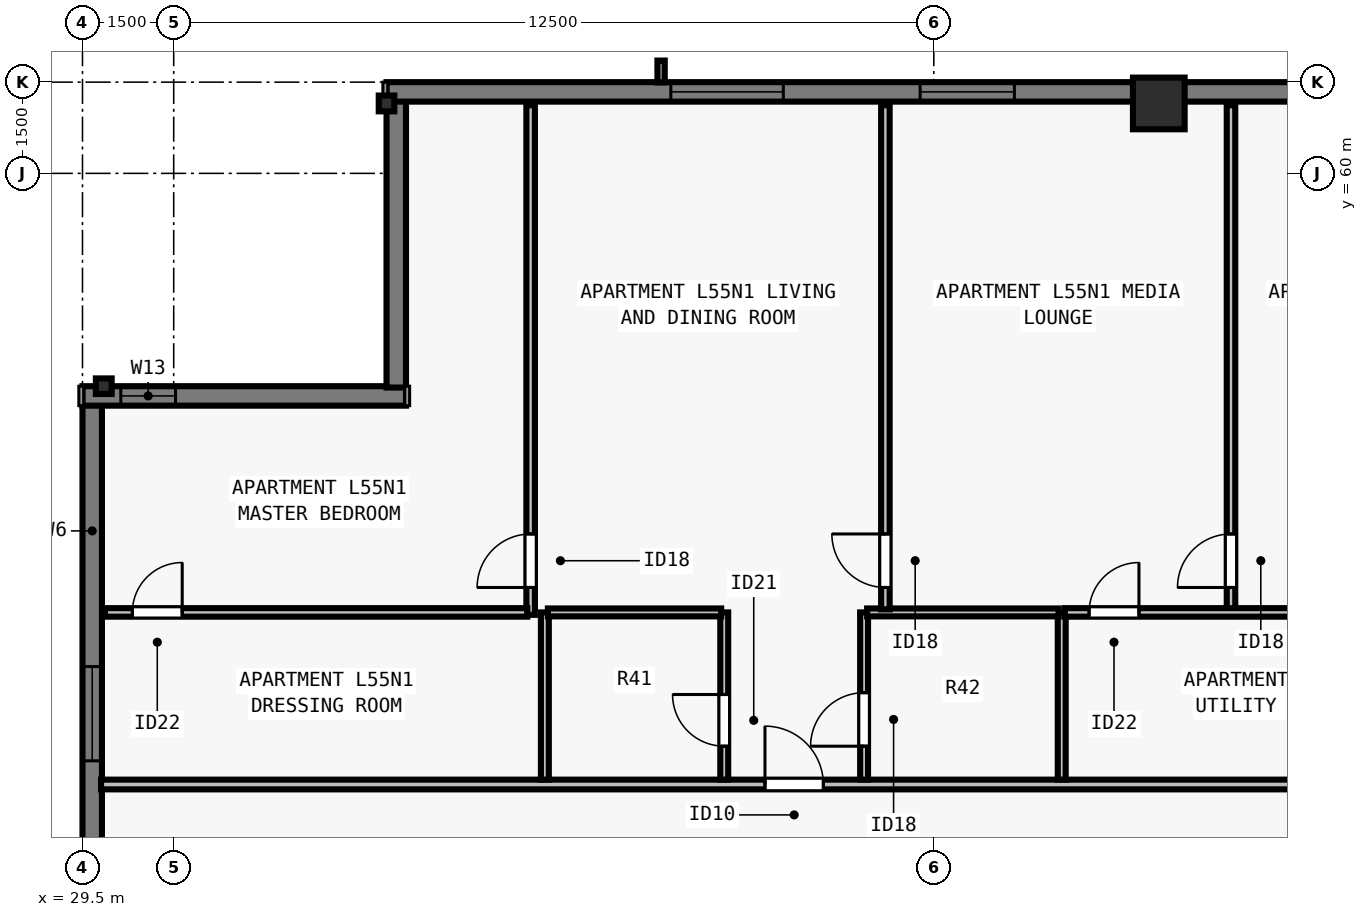
"""IFC4 building model, lengths in metres.
Left out: names, types, materials, properties, quantities, classifications, styles, units other than length and angle.
Written with IfcOpenShell. Run it as: python <this file> out.ifc"""

import sys

from ifc_helpers import new_model, si_unit, direction, frame, frame_2d, origin, origin_2d, place, context, subcontext, project, spatial, rectangle, i_section, extrude, element, fill, save


model = new_model("IFC4")
c1 = context("Model", 3, precision=1e-05, world=origin(), true_north=direction((0.0, 1.0)))
c2 = subcontext(c1, "Body", "Model", "MODEL_VIEW")
j1 = project(units=[si_unit("LENGTHUNIT", "METRE"), si_unit("PLANEANGLEUNIT", "RADIAN")], contexts=[c1])
p1 = place(None, origin())
s1 = spatial("IfcSite", under=j1, at=p1, CompositionType="ELEMENT")
p2 = place(p1, origin())
s2 = spatial("IfcBuilding", under=s1, at=p2, CompositionType="ELEMENT")
p3 = place(p2, frame((0.0, 0.0, 202.5)))
s3 = spatial("IfcBuildingStorey", under=s2, at=p3, CompositionType="ELEMENT", Elevation=202.5)
p4 = place(p3, frame((47.2, 61.15, 0.0), z_axis=(0.0, 0.0, 1.0), x_axis=(1.0, 0.0, 0.0)))
e1 = element("IfcColumn", 1, at=p4, inside=s3, PredefinedType="COLUMN", context=c2, shape_type="SweptSolid", body=[
    extrude(rectangle(XDim=0.85, YDim=0.85, at=origin_2d()), origin(), (0.0, 0.0, 1.0), 3.5),
])
for number, where, z_axis, x_axis in (
    (2, (34.5, 61.15, 0.0), (0.0, 0.0, 1.0), (1.0, 0.0, 0.0)),
    (3, (29.85, 56.5, 0.0), (0.0, 0.0, 1.0), (0.0, 1.0, 0.0)),
):
    element("IfcColumn", number, at=place(p3, frame(where, z_axis=z_axis, x_axis=x_axis)), inside=s3, PredefinedType="COLUMN", context=c2, shape_type="SweptSolid", body=[
        extrude(i_section(OverallWidth=0.256, OverallDepth=0.26, WebThickness=0.01, FlangeThickness=0.017, FilletRadius=0.013, at=origin_2d()), origin(), (0.0, 0.0, 1.0), 3.5),
    ])
p5 = place(p3, frame((29.66, 21.5, 0.0), z_axis=(0.0, 0.0, 1.0), x_axis=(0.0, 1.0, 0.0)))
e4 = element("IfcWall", 4, at=p5, inside=s3, PredefinedType="SOLIDWALL", context=c2, shape_type="SweptSolid", body=[
    extrude(rectangle(XDim=34.702, YDim=0.32, at=frame_2d((17.351, 0.0))), origin(), (0.0, 0.0, 1.0), 3.29),
])
p6 = place(p5, frame((4.163, 0.0, 0.8)))
e5 = element("IfcOpeningElement", 5, at=p6, cuts=e4, PredefinedType="OPENING", context=c2, shape_type="SweptSolid", body=[
    extrude(rectangle(XDim=1.85, YDim=1.678, at=frame_2d((0.925, 0.839))), frame((0.0, 0.17, 0.0), z_axis=(0.0, -1.0, 0.0), x_axis=(1.0, 0.0, 0.0)), (0.0, 0.0, 1.0), 0.34),
])
p7 = place(p5, frame((6.888, 0.0, 0.8)))
e6 = element("IfcOpeningElement", 6, at=p7, cuts=e4, PredefinedType="OPENING", context=c2, shape_type="SweptSolid", body=[
    extrude(rectangle(XDim=1.55, YDim=1.678, at=frame_2d((0.775, 0.839))), frame((0.0, 0.17, 0.0), z_axis=(0.0, -1.0, 0.0), x_axis=(1.0, 0.0, 0.0)), (0.0, 0.0, 1.0), 0.34),
])
p8 = place(p5, frame((10.113, 0.0, 0.8)))
e7 = element("IfcOpeningElement", 7, at=p8, cuts=e4, PredefinedType="OPENING", context=c2, shape_type="SweptSolid", body=[
    extrude(rectangle(XDim=1.85, YDim=1.678, at=frame_2d((0.925, 0.839))), frame((0.0, 0.17, 0.0), z_axis=(0.0, -1.0, 0.0), x_axis=(1.0, 0.0, 0.0)), (0.0, 0.0, 1.0), 0.34),
])
p9 = place(p5, frame((14.888, 0.0, 0.8)))
e8 = element("IfcOpeningElement", 8, at=p9, cuts=e4, PredefinedType="OPENING", context=c2, shape_type="SweptSolid", body=[
    extrude(rectangle(XDim=1.55, YDim=1.678, at=frame_2d((0.775, 0.839))), frame((0.0, 0.17, 0.0), z_axis=(0.0, -1.0, 0.0), x_axis=(1.0, 0.0, 0.0)), (0.0, 0.0, 1.0), 0.34),
])
p10 = place(p5, frame((19.364, 0.0, 0.8)))
e9 = element("IfcOpeningElement", 9, at=p10, cuts=e4, PredefinedType="OPENING", context=c2, shape_type="SweptSolid", body=[
    extrude(rectangle(XDim=1.85, YDim=1.678, at=frame_2d((0.925, 0.839))), frame((0.0, 0.17, 0.0), z_axis=(0.0, -1.0, 0.0), x_axis=(1.0, 0.0, 0.0)), (0.0, 0.0, 1.0), 0.34),
])
p11 = place(p5, frame((23.614, 0.0, 0.8)))
e10 = element("IfcOpeningElement", 10, at=p11, cuts=e4, PredefinedType="OPENING", context=c2, shape_type="SweptSolid", body=[
    extrude(rectangle(XDim=1.85, YDim=1.678, at=frame_2d((0.925, 0.839))), frame((0.0, 0.17, 0.0), z_axis=(0.0, -1.0, 0.0), x_axis=(1.0, 0.0, 0.0)), (0.0, 0.0, 1.0), 0.34),
])
p12 = place(p5, frame((28.839, 0.0, 0.8)))
e11 = element("IfcOpeningElement", 11, at=p12, cuts=e4, PredefinedType="OPENING", context=c2, shape_type="SweptSolid", body=[
    extrude(rectangle(XDim=1.55, YDim=1.678, at=frame_2d((0.775, 0.839))), frame((0.0, 0.17, 0.0), z_axis=(0.0, -1.0, 0.0), x_axis=(1.0, 0.0, 0.0)), (0.0, 0.0, 1.0), 0.34),
])
p13 = place(p3, frame((29.5, 56.34, 0.0), z_axis=(0.0, 0.0, 1.0), x_axis=(1.0, 0.0, 0.0)))
e12 = element("IfcWall", 12, at=p13, inside=s3, PredefinedType="SOLIDWALL", context=c2, shape_type="SweptSolid", body=[
    extrude(rectangle(XDim=5.32, YDim=0.32, at=frame_2d((2.66, 0.0))), origin(), (0.0, 0.0, 1.0), 3.29),
])
p14 = place(p13, frame((0.63, 0.0, 0.8)))
e13 = element("IfcOpeningElement", 13, at=p14, cuts=e12, PredefinedType="OPENING", context=c2, shape_type="SweptSolid", body=[
    extrude(rectangle(XDim=0.9, YDim=1.678, at=frame_2d((0.45, 0.839))), frame((0.0, 0.17, 0.0), z_axis=(0.0, -1.0, 0.0), x_axis=(1.0, 0.0, 0.0)), (0.0, 0.0, 1.0), 0.34),
])
p15 = place(p3, frame((34.66, 56.478, 0.0), z_axis=(0.0, 0.0, 1.0), x_axis=(0.0, 1.0, 0.0)))
e14 = element("IfcWall", 14, at=p15, inside=s3, PredefinedType="SOLIDWALL", context=c2, shape_type="SweptSolid", body=[
    extrude(rectangle(XDim=4.724, YDim=0.32, at=frame_2d((2.362, 0.0))), origin(), (0.0, 0.0, 1.0), 3.29),
])
p16 = place(p3, frame((34.5, 61.34, 0.0), z_axis=(0.0, 0.0, 1.0), x_axis=(1.0, 0.0, 0.0)))
e15 = element("IfcWall", 15, at=p16, inside=s3, PredefinedType="SOLIDWALL", context=c2, shape_type="SweptSolid", body=[
    extrude(rectangle(XDim=22.602, YDim=0.32, at=frame_2d((11.301, 0.0))), origin(), (0.0, 0.0, 1.0), 3.29),
])
p17 = place(p16, frame((4.675, 0.0, 0.8)))
e16 = element("IfcOpeningElement", 16, at=p17, cuts=e15, PredefinedType="OPENING", context=c2, shape_type="SweptSolid", body=[
    extrude(rectangle(XDim=1.85, YDim=1.678, at=frame_2d((0.925, 0.839))), frame((0.0, 0.17, 0.0), z_axis=(0.0, -1.0, 0.0), x_axis=(1.0, 0.0, 0.0)), (0.0, 0.0, 1.0), 0.34),
])
p18 = place(p16, frame((8.776, 0.0, 0.8)))
e17 = element("IfcOpeningElement", 17, at=p18, cuts=e15, PredefinedType="OPENING", context=c2, shape_type="SweptSolid", body=[
    extrude(rectangle(XDim=1.55, YDim=1.678, at=frame_2d((0.775, 0.839))), frame((0.0, 0.17, 0.0), z_axis=(0.0, -1.0, 0.0), x_axis=(1.0, 0.0, 0.0)), (0.0, 0.0, 1.0), 0.34),
])
p19 = place(p16, frame((15.326, 0.0, 0.8)))
e18 = element("IfcOpeningElement", 18, at=p19, cuts=e15, PredefinedType="OPENING", context=c2, shape_type="SweptSolid", body=[
    extrude(rectangle(XDim=1.55, YDim=1.678, at=frame_2d((0.775, 0.839))), frame((0.0, 0.17, 0.0), z_axis=(0.0, -1.0, 0.0), x_axis=(1.0, 0.0, 0.0)), (0.0, 0.0, 1.0), 0.34),
])
p20 = place(p16, frame((18.677, 0.0, 0.8)))
e19 = element("IfcOpeningElement", 19, at=p20, cuts=e15, PredefinedType="OPENING", context=c2, shape_type="SweptSolid", body=[
    extrude(rectangle(XDim=1.85, YDim=1.678, at=frame_2d((0.925, 0.839))), frame((0.0, 0.17, 0.0), z_axis=(0.0, -1.0, 0.0), x_axis=(1.0, 0.0, 0.0)), (0.0, 0.0, 1.0), 0.34),
])
p21 = place(p3, frame((29.805, 49.95, 0.0), z_axis=(0.0, 0.0, 1.0), x_axis=(1.0, 0.0, 0.0)))
e20 = element("IfcWall", 20, at=p21, inside=s3, PredefinedType="PARTITIONING", context=c2, shape_type="SweptSolid", body=[
    extrude(rectangle(XDim=44.39, YDim=0.16, at=frame_2d((22.195, 0.0))), origin(), (0.0, 0.0, 1.0), 2.958),
])
p22 = place(p21, frame((10.919, 0.0, 0.0)))
e21 = element("IfcOpeningElement", 21, at=p22, cuts=e20, PredefinedType="OPENING", context=c2, shape_type="SweptSolid", body=[
    extrude(rectangle(XDim=0.96, YDim=2.18, at=frame_2d((0.48, 1.09))), frame((0.0, 0.09, 0.0), z_axis=(0.0, -1.0, 0.0), x_axis=(1.0, 0.0, 0.0)), (0.0, 0.0, 1.0), 0.18),
])
p23 = place(p21, frame((32.999, 0.0, 0.0)))
e22 = element("IfcOpeningElement", 22, at=p23, cuts=e20, PredefinedType="OPENING", context=c2, shape_type="SweptSolid", body=[
    extrude(rectangle(XDim=0.96, YDim=2.18, at=frame_2d((0.48, 1.09))), frame((0.0, 0.09, 0.0), z_axis=(0.0, -1.0, 0.0), x_axis=(1.0, 0.0, 0.0)), (0.0, 0.0, 1.0), 0.18),
])
p24 = place(p3, frame((37.104, 50.03, 0.0), z_axis=(0.0, 0.0, 1.0), x_axis=(0.0, 1.0, 0.0)))
e23 = element("IfcWall", 23, at=p24, inside=s3, PredefinedType="PLUMBINGWALL", context=c2, shape_type="SweptSolid", body=[
    extrude(rectangle(XDim=2.75, YDim=0.13, at=frame_2d((1.375, 0.0))), origin(), (0.0, 0.0, 1.0), 3.29),
])
p25 = place(p3, frame((40.054, 50.03, 0.0), z_axis=(0.0, 0.0, 1.0), x_axis=(0.0, 1.0, 0.0)))
e24 = element("IfcWall", 24, at=p25, inside=s3, PredefinedType="PLUMBINGWALL", context=c2, shape_type="SweptSolid", body=[
    extrude(rectangle(XDim=2.75, YDim=0.13, at=frame_2d((1.375, 0.0))), origin(), (0.0, 0.0, 1.0), 2.573),
])
p26 = place(p25, frame((0.55, 0.0, 0.0)))
e25 = element("IfcOpeningElement", 25, at=p26, cuts=e24, PredefinedType="OPENING", context=c2, shape_type="SweptSolid", body=[
    extrude(rectangle(XDim=0.85, YDim=2.08, at=frame_2d((0.425, 1.04))), frame((0.0, 0.075, 0.0), z_axis=(0.0, -1.0, 0.0), x_axis=(1.0, 0.0, 0.0)), (0.0, 0.0, 1.0), 0.15),
])
p27 = place(p3, frame((37.154, 52.78, 0.0), z_axis=(0.0, 0.0, 1.0), x_axis=(1.0, 0.0, 0.0)))
e26 = element("IfcWall", 26, at=p27, inside=s3, PredefinedType="PLUMBINGWALL", context=c2, shape_type="SweptSolid", body=[
    extrude(rectangle(XDim=2.85, YDim=0.13, at=frame_2d((1.425, 0.0))), origin(), (0.0, 0.0, 1.0), 3.29),
])
p28 = place(p3, frame((45.604, 50.03, 0.0), z_axis=(0.0, 0.0, 1.0), x_axis=(0.0, 1.0, 0.0)))
e27 = element("IfcWall", 27, at=p28, inside=s3, PredefinedType="PLUMBINGWALL", context=c2, shape_type="SweptSolid", body=[
    extrude(rectangle(XDim=2.75, YDim=0.13, at=frame_2d((1.375, 0.0))), origin(), (0.0, 0.0, 1.0), 3.29),
])
p29 = place(p3, frame((42.354, 50.03, 0.0), z_axis=(0.0, 0.0, 1.0), x_axis=(0.0, 1.0, 0.0)))
e28 = element("IfcWall", 28, at=p29, inside=s3, PredefinedType="PLUMBINGWALL", context=c2, shape_type="SweptSolid", body=[
    extrude(rectangle(XDim=2.75, YDim=0.13, at=frame_2d((1.375, 0.0))), origin(), (0.0, 0.0, 1.0), 3.29),
])
p30 = place(p29, frame((0.55, 0.0, 0.0)))
e29 = element("IfcOpeningElement", 29, at=p30, cuts=e28, PredefinedType="OPENING", context=c2, shape_type="SweptSolid", body=[
    extrude(rectangle(XDim=0.88, YDim=2.1, at=frame_2d((0.44, 1.05))), frame((0.0, 0.075, 0.0), z_axis=(0.0, -1.0, 0.0), x_axis=(1.0, 0.0, 0.0)), (0.0, 0.0, 1.0), 0.15),
])
p31 = place(p3, frame((42.404, 52.78, 0.0), z_axis=(0.0, 0.0, 1.0), x_axis=(1.0, 0.0, 0.0)))
e30 = element("IfcWall", 30, at=p31, inside=s3, PredefinedType="PLUMBINGWALL", context=c2, shape_type="SweptSolid", body=[
    extrude(rectangle(XDim=3.15, YDim=0.13, at=frame_2d((1.575, 0.0))), origin(), (0.0, 0.0, 1.0), 3.29),
])
p32 = place(p3, frame((36.87, 52.74, 0.0), z_axis=(0.0, 0.0, 1.0), x_axis=(0.0, 1.0, 0.0)))
e31 = element("IfcWall", 31, at=p32, inside=s3, PredefinedType="PARTITIONING", context=c2, shape_type="SweptSolid", body=[
    extrude(rectangle(XDim=8.38, YDim=0.14, at=frame_2d((4.19, 0.0))), origin(), (0.0, 0.0, 1.0), 2.573),
])
p33 = place(p32, frame((0.45, 0.0, 0.0)))
e32 = element("IfcOpeningElement", 32, at=p33, cuts=e31, PredefinedType="OPENING", context=c2, shape_type="SweptSolid", body=[
    extrude(rectangle(XDim=0.88, YDim=2.1, at=frame_2d((0.44, 1.05))), frame((0.0, 0.08, 0.0), z_axis=(0.0, -1.0, 0.0), x_axis=(1.0, 0.0, 0.0)), (0.0, 0.0, 1.0), 0.16),
])
p34 = place(p3, frame((29.87, 52.78, 0.0), z_axis=(0.0, 0.0, 1.0), x_axis=(1.0, 0.0, 0.0)))
e33 = element("IfcWall", 33, at=p34, inside=s3, PredefinedType="PARTITIONING", context=c2, shape_type="SweptSolid", body=[
    extrude(rectangle(XDim=6.945, YDim=0.14, at=frame_2d((3.472, 0.0))), origin(), (0.0, 0.0, 1.0), 2.958),
])
p35 = place(p34, frame((0.45, 0.0, 0.0)))
e34 = element("IfcOpeningElement", 34, at=p35, cuts=e33, PredefinedType="OPENING", context=c2, shape_type="SweptSolid", body=[
    extrude(rectangle(XDim=0.82, YDim=2.1, at=frame_2d((0.41, 1.05))), frame((0.0, 0.08, 0.0), z_axis=(0.0, -1.0, 0.0), x_axis=(1.0, 0.0, 0.0)), (0.0, 0.0, 1.0), 0.16),
])
p36 = place(p3, frame((48.387, 52.74, 0.0), z_axis=(0.0, 0.0, 1.0), x_axis=(0.0, 1.0, 0.0)))
e35 = element("IfcWall", 35, at=p36, inside=s3, PredefinedType="PARTITIONING", context=c2, shape_type="SweptSolid", body=[
    extrude(rectangle(XDim=8.38, YDim=0.14, at=frame_2d((4.19, 0.0))), origin(), (0.0, 0.0, 1.0), 3.29),
])
p37 = place(p36, frame((0.45, 0.0, 0.0)))
e36 = element("IfcOpeningElement", 36, at=p37, cuts=e35, PredefinedType="OPENING", context=c2, shape_type="SweptSolid", body=[
    extrude(rectangle(XDim=0.88, YDim=2.1, at=frame_2d((0.44, 1.05))), frame((0.0, 0.08, 0.0), z_axis=(0.0, -1.0, 0.0), x_axis=(1.0, 0.0, 0.0)), (0.0, 0.0, 1.0), 0.16),
])
p38 = place(p3, frame((45.654, 52.78, 0.0), z_axis=(0.0, 0.0, 1.0), x_axis=(1.0, 0.0, 0.0)))
e37 = element("IfcWall", 37, at=p38, inside=s3, PredefinedType="PARTITIONING", context=c2, shape_type="SweptSolid", body=[
    extrude(rectangle(XDim=6.884, YDim=0.14, at=frame_2d((3.442, 0.0))), origin(), (0.0, 0.0, 1.0), 3.29),
])
p39 = place(p38, frame((0.4, 0.0, 0.0)))
e38 = element("IfcOpeningElement", 38, at=p39, cuts=e37, PredefinedType="OPENING", context=c2, shape_type="SweptSolid", body=[
    extrude(rectangle(XDim=0.82, YDim=2.1, at=frame_2d((0.41, 1.05))), frame((0.0, 0.08, 0.0), z_axis=(0.0, -1.0, 0.0), x_axis=(1.0, 0.0, 0.0)), (0.0, 0.0, 1.0), 0.16),
])
p40 = place(p3, frame((42.704, 52.83, 0.0), z_axis=(0.0, 0.0, 1.0), x_axis=(0.0, 1.0, 0.0)))
e39 = element("IfcWall", 39, at=p40, inside=s3, PredefinedType="PARTITIONING", context=c2, shape_type="SweptSolid", body=[
    extrude(rectangle(XDim=8.29, YDim=0.14, at=frame_2d((4.145, 0.0))), origin(), (0.0, 0.0, 1.0), 3.29),
])
p41 = place(p40, frame((0.36, 0.0, 0.0)))
e40 = element("IfcOpeningElement", 40, at=p41, cuts=e39, PredefinedType="OPENING", context=c2, shape_type="SweptSolid", body=[
    extrude(rectangle(XDim=0.88, YDim=2.1, at=frame_2d((0.44, 1.05))), frame((0.0, 0.08, 0.0), z_axis=(0.0, -1.0, 0.0), x_axis=(1.0, 0.0, 0.0)), (0.0, 0.0, 1.0), 0.16),
])
p42 = place(p12, origin())
e41 = element("IfcWindow", 41, at=p42, inside=s3, PartitioningType="SINGLE_PANEL", PredefinedType="WINDOW", context=c2, shape_type="SweptSolid", body=[
    extrude(rectangle(XDim=1.55, YDim=1.678, at=frame_2d((0.775, 0.839))), frame((0.0, -0.05, 0.0), z_axis=(0.0, -1.0, 0.0), x_axis=(1.0, 0.0, 0.0)), (0.0, 0.0, 1.0), 0.06),
])
fill(e11, e41)
p43 = place(p17, origin())
e42 = element("IfcWindow", 42, at=p43, inside=s3, PartitioningType="SINGLE_PANEL", PredefinedType="WINDOW", context=c2, shape_type="SweptSolid", body=[
    extrude(rectangle(XDim=1.85, YDim=1.678, at=frame_2d((0.925, 0.839))), frame((0.0, -0.05, 0.0), z_axis=(0.0, -1.0, 0.0), x_axis=(1.0, 0.0, 0.0)), (0.0, 0.0, 1.0), 0.06),
])
fill(e16, e42)
p44 = place(p18, origin())
e43 = element("IfcWindow", 43, at=p44, inside=s3, PartitioningType="SINGLE_PANEL", PredefinedType="WINDOW", context=c2, shape_type="SweptSolid", body=[
    extrude(rectangle(XDim=1.55, YDim=1.678, at=frame_2d((0.775, 0.839))), frame((0.0, -0.05, 0.0), z_axis=(0.0, -1.0, 0.0), x_axis=(1.0, 0.0, 0.0)), (0.0, 0.0, 1.0), 0.06),
])
fill(e17, e43)
p45 = place(p14, origin())
e44 = element("IfcWindow", 44, at=p45, inside=s3, PartitioningType="SINGLE_PANEL", PredefinedType="WINDOW", context=c2, shape_type="SweptSolid", body=[
    extrude(rectangle(XDim=0.9, YDim=1.678, at=frame_2d((0.45, 0.839))), frame((0.0, -0.04, 0.0), z_axis=(0.0, -1.0, 0.0), x_axis=(1.0, 0.0, 0.0)), (0.0, 0.0, 1.0), 0.06),
])
fill(e13, e44)
p46 = place(p26, origin())
e45 = element("IfcDoor", 45, at=p46, inside=s3, OperationType="SINGLE_SWING_RIGHT", PredefinedType="DOOR", context=c2, shape_type="SweptSolid", body=[
    extrude(rectangle(XDim=0.85, YDim=2.08, at=frame_2d((0.425, 1.04))), frame((0.0, 0.025, 0.0), z_axis=(0.0, -1.0, 0.0), x_axis=(1.0, 0.0, 0.0)), (0.0, 0.0, 1.0), 0.05),
])
fill(e25, e45)
p47 = place(p30, origin())
e46 = element("IfcDoor", 46, at=p47, inside=s3, OperationType="SINGLE_SWING_LEFT", PredefinedType="DOOR", context=c2, shape_type="SweptSolid", body=[
    extrude(rectangle(XDim=0.88, YDim=2.1, at=frame_2d((0.44, 1.05))), frame((0.0, 0.025, 0.0), z_axis=(0.0, -1.0, 0.0), x_axis=(1.0, 0.0, 0.0)), (0.0, 0.0, 1.0), 0.05),
])
fill(e29, e46)
p48 = place(p35, origin())
e47 = element("IfcDoor", 47, at=p48, inside=s3, OperationType="SINGLE_SWING_RIGHT", PredefinedType="DOOR", context=c2, shape_type="SweptSolid", body=[
    extrude(rectangle(XDim=0.82, YDim=2.1, at=frame_2d((0.41, 1.05))), frame((0.0, 0.025, 0.0), z_axis=(0.0, -1.0, 0.0), x_axis=(1.0, 0.0, 0.0)), (0.0, 0.0, 1.0), 0.05),
])
fill(e34, e47)
p49 = place(p33, origin())
e48 = element("IfcDoor", 48, at=p49, inside=s3, OperationType="SINGLE_SWING_LEFT", PredefinedType="DOOR", context=c2, shape_type="SweptSolid", body=[
    extrude(rectangle(XDim=0.88, YDim=2.1, at=frame_2d((0.44, 1.05))), frame((0.0, 0.025, 0.0), z_axis=(0.0, -1.0, 0.0), x_axis=(1.0, 0.0, 0.0)), (0.0, 0.0, 1.0), 0.05),
])
fill(e32, e48)
p50 = place(p39, origin())
e49 = element("IfcDoor", 49, at=p50, inside=s3, OperationType="SINGLE_SWING_RIGHT", PredefinedType="DOOR", context=c2, shape_type="SweptSolid", body=[
    extrude(rectangle(XDim=0.82, YDim=2.1, at=frame_2d((0.41, 1.05))), frame((0.0, 0.025, 0.0), z_axis=(0.0, -1.0, 0.0), x_axis=(1.0, 0.0, 0.0)), (0.0, 0.0, 1.0), 0.05),
])
fill(e38, e49)
p51 = place(p37, origin())
e50 = element("IfcDoor", 50, at=p51, inside=s3, OperationType="SINGLE_SWING_LEFT", PredefinedType="DOOR", context=c2, shape_type="SweptSolid", body=[
    extrude(rectangle(XDim=0.88, YDim=2.1, at=frame_2d((0.44, 1.05))), frame((0.0, 0.025, 0.0), z_axis=(0.0, -1.0, 0.0), x_axis=(1.0, 0.0, 0.0)), (0.0, 0.0, 1.0), 0.05),
])
fill(e36, e50)
p52 = place(p41, origin())
e51 = element("IfcDoor", 51, at=p52, inside=s3, OperationType="SINGLE_SWING_RIGHT", PredefinedType="DOOR", context=c2, shape_type="SweptSolid", body=[
    extrude(rectangle(XDim=0.88, YDim=2.1, at=frame_2d((0.44, 1.05))), frame((0.0, 0.025, 0.0), z_axis=(0.0, -1.0, 0.0), x_axis=(1.0, 0.0, 0.0)), (0.0, 0.0, 1.0), 0.05),
])
fill(e40, e51)
p53 = place(p22, origin())
e52 = element("IfcDoor", 52, at=p53, inside=s3, OperationType="SINGLE_SWING_LEFT", PredefinedType="DOOR", context=c2, shape_type="SweptSolid", body=[
    extrude(rectangle(XDim=0.96, YDim=2.18, at=frame_2d((0.48, 1.09))), frame((0.0, 0.025, 0.0), z_axis=(0.0, -1.0, 0.0), x_axis=(1.0, 0.0, 0.0)), (0.0, 0.0, 1.0), 0.05),
])
fill(e21, e52)
save(model, sys.argv[1])
